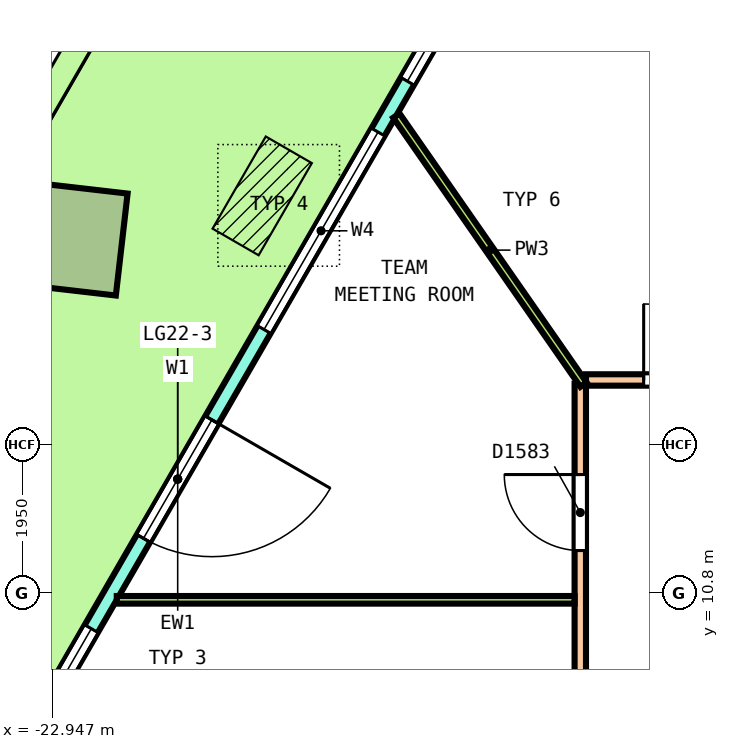
"""IFC4 building model, lengths in metres.
Left out: names, types, materials, properties, quantities, classifications, styles, units other than length and angle.
Written with IfcOpenShell. Run it as: python <this file> out.ifc"""

import sys

from ifc_helpers import new_model, si_unit, direction, frame, frame_2d, origin, origin_2d, place, context, subcontext, project, spatial, polyline, rectangle, outline, extrude, element, fill, save


model = new_model("IFC4")
c1 = context("Model", 3, precision=1e-05, world=origin(), true_north=direction((0.0, 1.0)))
c2 = subcontext(c1, "Body", "Model", "MODEL_VIEW")
j1 = project(units=[si_unit("LENGTHUNIT", "METRE"), si_unit("PLANEANGLEUNIT", "RADIAN")], contexts=[c1])
p1 = place(None, origin())
s1 = spatial("IfcSite", under=j1, at=p1, CompositionType="ELEMENT")
p2 = place(p1, origin())
s2 = spatial("IfcBuilding", under=s1, at=p2, CompositionType="ELEMENT")
p3 = place(p2, frame((0.0, 0.0, 102.8)))
s3 = spatial("IfcBuildingStorey", under=s2, at=p3, CompositionType="ELEMENT", Elevation=102.8)
p4 = place(p3, frame((-22.704, 15.459, 0.0), z_axis=(-0.028980638596, 0.012592418849, 0.999500652113), x_axis=(-0.500965869369, -0.865459461575, -0.003621891356)))
e1 = element("IfcColumn", 1, at=p4, inside=s3, PredefinedType="COLUMN", context=c2, shape_type="SweptSolid", body=[
    extrude(rectangle(XDim=1.35, YDim=1.35, at=origin_2d()), origin(), (0.0, 0.0, 1.0), 4.052),
])
p5 = place(p3, frame((-16.582, 20.463, 0.0), z_axis=(0.0, 0.0, 1.0), x_axis=(-0.499999588275, -0.866025641494, 0.0)))
e2 = element("IfcWall", 2, at=p5, inside=s3, PredefinedType="SOLIDWALL", context=c2, shape_type="SweptSolid", body=[
    extrude(outline(polyline([(-0.027, -0.1), (1.024, -0.1), (2.075, -0.1), (3.125, -0.1), (4.176, -0.1), (5.227, -0.1), (6.278, -0.1), (7.329, -0.1), (8.38, -0.1), (9.43, -0.1), (10.481, -0.1), (11.532, -0.1), (12.583, -0.1), (13.634, -0.1), (14.685, -0.1), (15.735, -0.1), (16.786, -0.1), (17.837, -0.1), (18.888, -0.1), (18.834, 0.1), (17.789, 0.1), (16.744, 0.1), (15.699, 0.1), (14.655, 0.1), (13.61, 0.1), (12.565, 0.1), (11.52, 0.1), (10.475, 0.1), (9.43, 0.1), (8.385, 0.1), (7.341, 0.1), (6.296, 0.1), (5.251, 0.1), (4.206, 0.1), (3.161, 0.1), (2.116, 0.1), (1.072, 0.1), (0.027, 0.1), (-0.027, -0.1)])), origin(), (0.0, 0.0, 1.0), 4.1),
])
p6 = place(p5, frame((0.386, 0.0, 0.1)))
e3 = element("IfcOpeningElement", 3, at=p6, cuts=e2, PredefinedType="OPENING", context=c2, shape_type="SweptSolid", body=[
    extrude(rectangle(XDim=3.0, YDim=2.9, at=frame_2d((1.5, 1.45))), frame((0.0, 0.11, 0.0), z_axis=(0.0, -1.0, 0.0), x_axis=(1.0, 0.0, 0.0)), (0.0, 0.0, 1.0), 0.22),
])
p7 = place(p5, frame((4.158, 0.0, 0.1)))
e4 = element("IfcOpeningElement", 4, at=p7, cuts=e2, PredefinedType="OPENING", context=c2, shape_type="SweptSolid", body=[
    extrude(rectangle(XDim=3.0, YDim=2.9, at=frame_2d((1.5, 1.45))), frame((0.0, 0.11, 0.0), z_axis=(0.0, -1.0, 0.0), x_axis=(1.0, 0.0, 0.0)), (0.0, 0.0, 1.0), 0.22),
])
p8 = place(p5, frame((8.531, 0.0, 0.0)))
e5 = element("IfcOpeningElement", 5, at=p8, cuts=e2, PredefinedType="OPENING", context=c2, shape_type="SweptSolid", body=[
    extrude(rectangle(XDim=1.8, YDim=2.4, at=frame_2d((0.9, 1.2))), frame((0.0, 0.11, 0.0), z_axis=(0.0, -1.0, 0.0), x_axis=(1.0, 0.0, 0.0)), (0.0, 0.0, 1.0), 0.22),
])
p9 = place(p5, frame((8.531, 0.0, 2.55)))
e6 = element("IfcOpeningElement", 6, at=p9, cuts=e2, PredefinedType="OPENING", context=c2, shape_type="SweptSolid", body=[
    extrude(rectangle(XDim=1.8, YDim=0.45, at=frame_2d((0.9, 0.225))), frame((0.0, 0.11, 0.0), z_axis=(0.0, -1.0, 0.0), x_axis=(1.0, 0.0, 0.0)), (0.0, 0.0, 1.0), 0.22),
])
p10 = place(p5, frame((11.703, 0.0, 0.1)))
e7 = element("IfcOpeningElement", 7, at=p10, cuts=e2, PredefinedType="OPENING", context=c2, shape_type="SweptSolid", body=[
    extrude(rectangle(XDim=3.0, YDim=2.9, at=frame_2d((1.5, 1.45))), frame((0.0, 0.11, 0.0), z_axis=(0.0, -1.0, 0.0), x_axis=(1.0, 0.0, 0.0)), (0.0, 0.0, 1.0), 0.22),
])
p11 = place(p5, frame((15.475, 0.0, 0.1)))
e8 = element("IfcOpeningElement", 8, at=p11, cuts=e2, PredefinedType="OPENING", context=c2, shape_type="SweptSolid", body=[
    extrude(rectangle(XDim=3.0, YDim=2.9, at=frame_2d((1.5, 1.45))), frame((0.0, 0.11, 0.0), z_axis=(0.0, -1.0, 0.0), x_axis=(1.0, 0.0, 0.0)), (0.0, 0.0, 1.0), 0.22),
])
p12 = place(p3, frame((-15.925, 13.6, 0.0), z_axis=(0.0, 0.0, 1.0), x_axis=(1.0, 0.0, 0.0)))
e9 = element("IfcWall", 9, at=p12, inside=s3, PredefinedType="PARTITIONING", context=c2, shape_type="SweptSolid", body=[
    extrude(rectangle(XDim=31.85, YDim=0.15, at=frame_2d((15.925, 0.0))), origin(), (0.0, 0.0, 1.0), 3.05),
])
p13 = place(p12, frame((30.414, 0.0, 0.0)))
e10 = element("IfcOpeningElement", 10, at=p13, cuts=e9, PredefinedType="OPENING", context=c2, shape_type="SweptSolid", body=[
    extrude(rectangle(XDim=1.0, YDim=2.1, at=frame_2d((0.5, 1.05))), frame((0.0, 0.085, 0.0), z_axis=(0.0, -1.0, 0.0), x_axis=(1.0, 0.0, 0.0)), (0.0, 0.0, 1.0), 0.17),
])
p14 = place(p12, frame((27.775, 0.0, 0.0)))
e11 = element("IfcOpeningElement", 11, at=p14, cuts=e9, PredefinedType="OPENING", context=c2, shape_type="SweptSolid", body=[
    extrude(rectangle(XDim=1.0, YDim=2.1, at=frame_2d((0.5, 1.05))), frame((0.0, 0.085, 0.0), z_axis=(0.0, -1.0, 0.0), x_axis=(1.0, 0.0, 0.0)), (0.0, 0.0, 1.0), 0.17),
])
p15 = place(p12, frame((16.865, 0.0, 0.0)))
e12 = element("IfcOpeningElement", 12, at=p15, cuts=e9, PredefinedType="OPENING", context=c2, shape_type="SweptSolid", body=[
    extrude(rectangle(XDim=1.2, YDim=2.1, at=frame_2d((0.6, 1.05))), frame((0.0, 0.085, 0.0), z_axis=(0.0, -1.0, 0.0), x_axis=(1.0, 0.0, 0.0)), (0.0, 0.0, 1.0), 0.17),
])
p16 = place(p12, frame((10.738, 0.0, 0.0)))
e13 = element("IfcOpeningElement", 13, at=p16, cuts=e9, PredefinedType="OPENING", context=c2, shape_type="SweptSolid", body=[
    extrude(rectangle(XDim=1.0, YDim=2.1, at=frame_2d((0.5, 1.05))), frame((0.0, 0.085, 0.0), z_axis=(0.0, -1.0, 0.0), x_axis=(1.0, 0.0, 0.0)), (0.0, 0.0, 1.0), 0.17),
])
p17 = place(p12, frame((3.075, 0.0, 0.0)))
e14 = element("IfcOpeningElement", 14, at=p17, cuts=e9, PredefinedType="OPENING", context=c2, shape_type="SweptSolid", body=[
    extrude(rectangle(XDim=1.0, YDim=2.1, at=frame_2d((0.5, 1.05))), frame((0.0, 0.085, 0.0), z_axis=(0.0, -1.0, 0.0), x_axis=(1.0, 0.0, 0.0)), (0.0, 0.0, 1.0), 0.17),
])
p18 = place(p12, frame((0.759, 0.0, 0.0)))
e15 = element("IfcOpeningElement", 15, at=p18, cuts=e9, PredefinedType="OPENING", context=c2, shape_type="SweptSolid", body=[
    extrude(rectangle(XDim=1.0, YDim=2.1, at=frame_2d((0.5, 1.05))), frame((0.0, 0.085, 0.0), z_axis=(0.0, -1.0, 0.0), x_axis=(1.0, 0.0, 0.0)), (0.0, 0.0, 1.0), 0.17),
])
p19 = place(p3, frame((-16.0, -13.525, 0.0), z_axis=(0.0, 0.0, 1.0), x_axis=(0.0, 1.0, 0.0)))
e16 = element("IfcWall", 16, at=p19, inside=s3, PredefinedType="PARTITIONING", context=c2, shape_type="SweptSolid", body=[
    extrude(rectangle(XDim=27.075, YDim=0.15, at=frame_2d((13.538, 0.0))), origin(), (0.0, 0.0, 1.0), 3.05),
])
p20 = place(p19, frame((24.881, 0.0, 0.0)))
e17 = element("IfcOpeningElement", 17, at=p20, cuts=e16, PredefinedType="OPENING", context=c2, shape_type="SweptSolid", body=[
    extrude(rectangle(XDim=1.0, YDim=2.1, at=frame_2d((0.5, 1.05))), frame((0.0, 0.085, 0.0), z_axis=(0.0, -1.0, 0.0), x_axis=(1.0, 0.0, 0.0)), (0.0, 0.0, 1.0), 0.17),
])
p21 = place(p19, frame((19.659, 0.0, 0.0)))
e18 = element("IfcOpeningElement", 18, at=p21, cuts=e16, PredefinedType="OPENING", context=c2, shape_type="SweptSolid", body=[
    extrude(rectangle(XDim=1.2, YDim=2.1, at=frame_2d((0.6, 1.05))), frame((0.0, 0.085, 0.0), z_axis=(0.0, -1.0, 0.0), x_axis=(1.0, 0.0, 0.0)), (0.0, 0.0, 1.0), 0.17),
])
p22 = place(p19, frame((14.873, 0.0, 0.0)))
e19 = element("IfcOpeningElement", 19, at=p22, cuts=e16, PredefinedType="OPENING", context=c2, shape_type="SweptSolid", body=[
    extrude(rectangle(XDim=1.2, YDim=2.1, at=frame_2d((0.6, 1.05))), frame((0.0, 0.085, 0.0), z_axis=(0.0, -1.0, 0.0), x_axis=(1.0, 0.0, 0.0)), (0.0, 0.0, 1.0), 0.17),
])
p23 = place(p19, frame((7.832, 0.0, 0.0)))
e20 = element("IfcOpeningElement", 20, at=p23, cuts=e16, PredefinedType="OPENING", context=c2, shape_type="SweptSolid", body=[
    extrude(rectangle(XDim=1.2, YDim=2.1, at=frame_2d((0.6, 1.05))), frame((0.0, 0.085, 0.0), z_axis=(0.0, -1.0, 0.0), x_axis=(1.0, 0.0, 0.0)), (0.0, 0.0, 1.0), 0.17),
])
p24 = place(p19, frame((1.409, 0.0, 0.0)))
e21 = element("IfcOpeningElement", 21, at=p24, cuts=e16, PredefinedType="OPENING", context=c2, shape_type="SweptSolid", body=[
    extrude(rectangle(XDim=1.0, YDim=2.1, at=frame_2d((0.5, 1.05))), frame((0.0, 0.085, 0.0), z_axis=(0.0, -1.0, 0.0), x_axis=(1.0, 0.0, 0.0)), (0.0, 0.0, 1.0), 0.17),
])
p25 = place(p3, frame((-22.098, 10.708, 0.0), z_axis=(0.0, 0.0, 1.0), x_axis=(1.0, 0.0, 0.0)))
e22 = element("IfcWall", 22, at=p25, inside=s3, PredefinedType="PARTITIONING", context=c2, shape_type="SweptSolid", body=[
    extrude(rectangle(XDim=6.023, YDim=0.1, at=frame_2d((3.012, 0.0))), origin(), (0.0, 0.0, 1.0), 3.05),
])
p26 = place(p3, frame((-18.42, 17.078, 0.0), z_axis=(0.0, 0.0, 1.0), x_axis=(0.571066146954, -0.820904047866, 0.0)))
e23 = element("IfcWall", 23, at=p26, inside=s3, PredefinedType="PARTITIONING", context=c2, shape_type="SweptSolid", body=[
    extrude(rectangle(XDim=4.312, YDim=0.1, at=frame_2d((2.156, 0.0))), origin(), (0.0, 0.0, 1.0), 3.05),
])
p27 = place(p6, origin())
e24 = element("IfcWindow", 24, at=p27, inside=s3, PartitioningType="SINGLE_PANEL", PredefinedType="WINDOW", context=c2, shape_type="SweptSolid", body=[
    extrude(rectangle(XDim=3.0, YDim=2.9, at=frame_2d((1.5, 1.45))), frame((0.0, 0.03, 0.0), z_axis=(0.0, -1.0, 0.0), x_axis=(1.0, 0.0, 0.0)), (0.0, 0.0, 1.0), 0.06),
])
fill(e3, e24)
p28 = place(p7, origin())
e25 = element("IfcWindow", 25, at=p28, inside=s3, PartitioningType="SINGLE_PANEL", PredefinedType="WINDOW", context=c2, shape_type="SweptSolid", body=[
    extrude(rectangle(XDim=3.0, YDim=2.9, at=frame_2d((1.5, 1.45))), frame((0.0, 0.03, 0.0), z_axis=(0.0, -1.0, 0.0), x_axis=(1.0, 0.0, 0.0)), (0.0, 0.0, 1.0), 0.06),
])
fill(e4, e25)
p29 = place(p8, origin())
e26 = element("IfcDoor", 26, at=p29, inside=s3, OperationType="DOUBLE_DOOR_SINGLE_SWING", PredefinedType="DOOR", context=c2, shape_type="SweptSolid", body=[
    extrude(rectangle(XDim=1.8, YDim=2.4, at=frame_2d((0.9, 1.2))), frame((0.0, 0.025, 0.0), z_axis=(0.0, -1.0, 0.0), x_axis=(1.0, 0.0, 0.0)), (0.0, 0.0, 1.0), 0.05),
])
fill(e5, e26)
p30 = place(p9, origin())
e27 = element("IfcWindow", 27, at=p30, inside=s3, PartitioningType="SINGLE_PANEL", PredefinedType="WINDOW", context=c2, shape_type="SweptSolid", body=[
    extrude(rectangle(XDim=1.8, YDim=0.45, at=frame_2d((0.9, 0.225))), frame((0.0, 0.03, 0.0), z_axis=(0.0, -1.0, 0.0), x_axis=(1.0, 0.0, 0.0)), (0.0, 0.0, 1.0), 0.06),
])
fill(e6, e27)
p31 = place(p10, origin())
e28 = element("IfcWindow", 28, at=p31, inside=s3, PartitioningType="SINGLE_PANEL", PredefinedType="WINDOW", context=c2, shape_type="SweptSolid", body=[
    extrude(rectangle(XDim=3.0, YDim=2.9, at=frame_2d((1.5, 1.45))), frame((0.0, 0.03, 0.0), z_axis=(0.0, -1.0, 0.0), x_axis=(1.0, 0.0, 0.0)), (0.0, 0.0, 1.0), 0.06),
])
fill(e7, e28)
p32 = place(p18, origin())
e29 = element("IfcDoor", 29, at=p32, inside=s3, OperationType="SINGLE_SWING_LEFT", PredefinedType="DOOR", context=c2, shape_type="SweptSolid", body=[
    extrude(rectangle(XDim=1.0, YDim=2.1, at=frame_2d((0.5, 1.05))), frame((0.0, 0.025, 0.0), z_axis=(0.0, -1.0, 0.0), x_axis=(1.0, 0.0, 0.0)), (0.0, 0.0, 1.0), 0.05),
])
fill(e15, e29)
p33 = place(p20, origin())
e30 = element("IfcDoor", 30, at=p33, inside=s3, OperationType="SINGLE_SWING_RIGHT", PredefinedType="DOOR", context=c2, shape_type="SweptSolid", body=[
    extrude(rectangle(XDim=1.0, YDim=2.1, at=frame_2d((0.5, 1.05))), frame((0.0, 0.025, 0.0), z_axis=(0.0, -1.0, 0.0), x_axis=(1.0, 0.0, 0.0)), (0.0, 0.0, 1.0), 0.05),
])
fill(e17, e30)
save(model, sys.argv[1])
